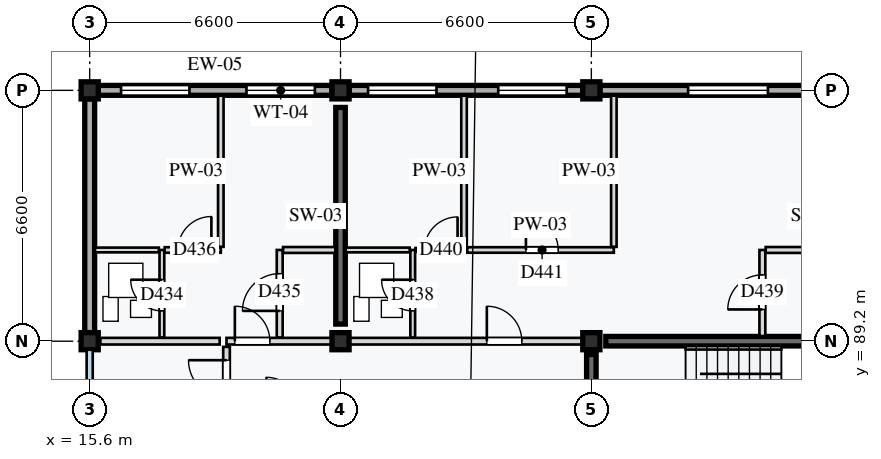
"""IFC4 building model, lengths in metres.
Left out: names, types, materials, properties, quantities, classifications, styles, units other than length and angle.
Written with IfcOpenShell. Run it as: python <this file> out.ifc"""

import sys

from ifc_helpers import new_model, si_unit, direction, frame, frame_2d, origin, origin_2d, place, context, subcontext, project, spatial, rectangle, extrude, element, fill, save


model = new_model("IFC4")
c1 = context("Model", 3, precision=1e-05, world=origin(), true_north=direction((0.0, 1.0)))
c2 = subcontext(c1, "Body", "Model", "MODEL_VIEW")
j1 = project(units=[si_unit("LENGTHUNIT", "METRE"), si_unit("PLANEANGLEUNIT", "RADIAN")], contexts=[c1])
p1 = place(None, origin())
s1 = spatial("IfcSite", under=j1, at=p1, CompositionType="ELEMENT")
p2 = place(p1, origin())
s2 = spatial("IfcBuilding", under=s1, at=p2, CompositionType="ELEMENT")
p3 = place(p2, frame((0.0, 0.0, 43.6)))
s3 = spatial("IfcBuildingStorey", under=s2, at=p3, CompositionType="ELEMENT", Elevation=43.6)
for number, where, z_axis, x_axis in (
    (1, (15.6, 89.2, 0.0), (0.0, 0.0, 1.0), (1.0, 0.0, 0.0)),
    (2, (15.6, 95.8, 0.0), (0.0, 0.0, 1.0), (1.0, 0.0, 0.0)),
    (3, (22.2, 89.2, 0.0), (0.0, 0.0, 1.0), (1.0, 0.0, 0.0)),
    (4, (22.2, 95.8, 0.0), (0.0, 0.0, 1.0), (1.0, 0.0, 0.0)),
    (5, (28.8, 89.2, 0.0), (0.0, 0.0, 1.0), (1.0, 0.0, 0.0)),
    (6, (28.8, 95.8, 0.0), (0.0, 0.0, 1.0), (1.0, 0.0, 0.0)),
):
    element("IfcColumn", number, at=place(p3, frame(where, z_axis=z_axis, x_axis=x_axis)), inside=s3, PredefinedType="COLUMN", context=c2, shape_type="SweptSolid", body=[
        extrude(rectangle(XDim=0.45, YDim=0.45, at=origin_2d()), origin(), (0.0, 0.0, 1.0), 3.2),
    ])
p4 = place(p3, frame((29.18, 89.2, 0.0), z_axis=(0.0, 0.0, 1.0), x_axis=(1.0, 0.0, 0.0)))
e7 = element("IfcWall", 7, at=p4, inside=s3, PredefinedType="SHEAR", context=c2, shape_type="SweptSolid", body=[
    extrude(rectangle(XDim=5.84, YDim=0.25, at=frame_2d((2.92, 0.0))), origin(), (0.0, 0.0, 1.0), 2.98),
])
p5 = place(p3, frame((28.8, 86.05, 0.0), z_axis=(0.0, 0.0, 1.0), x_axis=(0.0, 1.0, 0.0)))
e8 = element("IfcWall", 8, at=p5, inside=s3, PredefinedType="SHEAR", context=c2, shape_type="SweptSolid", body=[
    extrude(rectangle(XDim=2.8, YDim=0.25, at=frame_2d((1.4, 0.0))), origin(), (0.0, 0.0, 1.0), 2.98),
])
p6 = place(p3, frame((22.2, 89.65, 0.0), z_axis=(0.0, 0.0, 1.0), x_axis=(0.0, 1.0, 0.0)))
e9 = element("IfcWall", 9, at=p6, inside=s3, PredefinedType="SHEAR", context=c2, shape_type="SweptSolid", body=[
    extrude(rectangle(XDim=5.7, YDim=0.25, at=frame_2d((2.85, 0.0))), origin(), (0.0, 0.0, 1.0), 2.98),
])
p7 = place(p3, frame((15.825, 95.8, 0.0), z_axis=(0.0, 0.0, 1.0), x_axis=(1.0, 0.0, 0.0)))
e10 = element("IfcWall", 10, at=p7, inside=s3, PredefinedType="STANDARD", context=c2, shape_type="SweptSolid", body=[
    extrude(rectangle(XDim=6.15, YDim=0.26, at=frame_2d((3.075, 0.0))), origin(), (0.0, 0.0, 1.0), 2.6),
])
p8 = place(p7, frame((0.6, 0.0, 0.85)))
e11 = element("IfcOpeningElement", 11, at=p8, cuts=e10, PredefinedType="OPENING", context=c2, shape_type="SweptSolid", body=[
    extrude(rectangle(XDim=1.8, YDim=1.35, at=frame_2d((0.9, 0.675))), frame((0.0, 0.14, 0.0), z_axis=(0.0, -1.0, 0.0), x_axis=(1.0, 0.0, 0.0)), (0.0, 0.0, 1.0), 0.28),
])
p9 = place(p7, frame((3.9, 0.0, 0.85)))
e12 = element("IfcOpeningElement", 12, at=p9, cuts=e10, PredefinedType="OPENING", context=c2, shape_type="SweptSolid", body=[
    extrude(rectangle(XDim=1.8, YDim=1.55, at=frame_2d((0.9, 0.775))), frame((0.0, 0.14, 0.0), z_axis=(0.0, -1.0, 0.0), x_axis=(1.0, 0.0, 0.0)), (0.0, 0.0, 1.0), 0.28),
])
p10 = place(p3, frame((22.425, 95.8, 0.0), z_axis=(0.0, 0.0, 1.0), x_axis=(1.0, 0.0, 0.0)))
e13 = element("IfcWall", 13, at=p10, inside=s3, PredefinedType="STANDARD", context=c2, shape_type="SweptSolid", body=[
    extrude(rectangle(XDim=6.15, YDim=0.26, at=frame_2d((3.075, 0.0))), origin(), (0.0, 0.0, 1.0), 2.6),
])
p11 = place(p10, frame((0.5, 0.0, 0.85)))
e14 = element("IfcOpeningElement", 14, at=p11, cuts=e13, PredefinedType="OPENING", context=c2, shape_type="SweptSolid", body=[
    extrude(rectangle(XDim=1.8, YDim=1.35, at=frame_2d((0.9, 0.675))), frame((0.0, 0.14, 0.0), z_axis=(0.0, -1.0, 0.0), x_axis=(1.0, 0.0, 0.0)), (0.0, 0.0, 1.0), 0.28),
])
p12 = place(p10, frame((3.925, 0.0, 0.85)))
e15 = element("IfcOpeningElement", 15, at=p12, cuts=e13, PredefinedType="OPENING", context=c2, shape_type="SweptSolid", body=[
    extrude(rectangle(XDim=1.8, YDim=1.35, at=frame_2d((0.9, 0.675))), frame((0.0, 0.14, 0.0), z_axis=(0.0, -1.0, 0.0), x_axis=(1.0, 0.0, 0.0)), (0.0, 0.0, 1.0), 0.28),
])
p13 = place(p3, frame((29.025, 95.8, 0.0), z_axis=(0.0, 0.0, 1.0), x_axis=(1.0, 0.0, 0.0)))
e16 = element("IfcWall", 16, at=p13, inside=s3, PredefinedType="STANDARD", context=c2, shape_type="SweptSolid", body=[
    extrude(rectangle(XDim=6.15, YDim=0.26, at=frame_2d((3.075, 0.0))), origin(), (0.0, 0.0, 1.0), 2.6),
])
p14 = place(p13, frame((2.321, 0.0, 0.85)))
e17 = element("IfcOpeningElement", 17, at=p14, cuts=e16, PredefinedType="OPENING", context=c2, shape_type="SweptSolid", body=[
    extrude(rectangle(XDim=2.1, YDim=1.55, at=frame_2d((1.05, 0.775))), frame((0.0, 0.14, 0.0), z_axis=(0.0, -1.0, 0.0), x_axis=(1.0, 0.0, 0.0)), (0.0, 0.0, 1.0), 0.28),
])
p15 = place(p3, frame((15.6, 89.425, 0.0), z_axis=(0.0, 0.0, 1.0), x_axis=(0.0, 1.0, 0.0)))
e18 = element("IfcWall", 18, at=p15, inside=s3, PredefinedType="STANDARD", context=c2, shape_type="SweptSolid", body=[
    extrude(rectangle(XDim=6.15, YDim=0.26, at=frame_2d((3.075, 0.0))), origin(), (0.0, 0.0, 1.0), 2.65),
])
p16 = place(p3, frame((19.2, 86.05, 0.0), z_axis=(0.0, 0.0, 1.0), x_axis=(0.0, 1.0, 0.0)))
e19 = element("IfcWall", 19, at=p16, inside=s3, PredefinedType="PARTITIONING", context=c2, shape_type="SweptSolid", body=[
    extrude(rectangle(XDim=3.0, YDim=0.175, at=frame_2d((1.5, 0.0))), origin(), (0.0, 0.0, 1.0), 2.98),
])
p17 = place(p16, frame((1.65, 0.0, 0.0)))
e20 = element("IfcOpeningElement", 20, at=p17, cuts=e19, PredefinedType="OPENING", context=c2, shape_type="SweptSolid", body=[
    extrude(rectangle(XDim=1.0, YDim=2.16, at=frame_2d((0.5, 1.08))), frame((0.0, 0.097, 0.0), z_axis=(0.0, -1.0, 0.0), x_axis=(1.0, 0.0, 0.0)), (0.0, 0.0, 1.0), 0.195),
])
p18 = place(p3, frame((15.88, 89.2, 0.0), z_axis=(0.0, 0.0, 1.0), x_axis=(1.0, 0.0, 0.0)))
e21 = element("IfcWall", 21, at=p18, inside=s3, PredefinedType="PARTITIONING", context=c2, shape_type="SweptSolid", body=[
    extrude(rectangle(XDim=3.14, YDim=0.175, at=frame_2d((1.57, 0.0))), origin(), (0.0, 0.0, 1.0), 2.7),
])
p19 = place(p3, frame((19.2, 89.2, 0.0), z_axis=(0.0, 0.0, 1.0), x_axis=(1.0, 0.0, 0.0)))
e22 = element("IfcWall", 22, at=p19, inside=s3, PredefinedType="PARTITIONING", context=c2, shape_type="SweptSolid", body=[
    extrude(rectangle(XDim=3.0, YDim=0.175, at=frame_2d((1.5, 0.0))), origin(), (0.0, 0.0, 1.0), 2.7),
])
p20 = place(p19, frame((0.22, 0.0, 0.0)))
e23 = element("IfcOpeningElement", 23, at=p20, cuts=e22, PredefinedType="OPENING", context=c2, shape_type="SweptSolid", body=[
    extrude(rectangle(XDim=0.92, YDim=2.14, at=frame_2d((0.46, 1.07))), frame((0.0, 0.097, 0.0), z_axis=(0.0, -1.0, 0.0), x_axis=(1.0, 0.0, 0.0)), (0.0, 0.0, 1.0), 0.195),
])
p21 = place(p3, frame((17.5, 89.298, 0.0), z_axis=(0.0, 0.0, 1.0), x_axis=(0.0, 1.0, 0.0)))
e24 = element("IfcWall", 24, at=p21, inside=s3, PredefinedType="PARTITIONING", context=c2, shape_type="SweptSolid", body=[
    extrude(rectangle(XDim=2.302, YDim=0.125, at=frame_2d((1.151, 0.0))), origin(), (0.0, 0.0, 1.0), 2.98),
])
p22 = place(p21, frame((0.7, 0.0, 0.0)))
e25 = element("IfcOpeningElement", 25, at=p22, cuts=e24, PredefinedType="OPENING", context=c2, shape_type="SweptSolid", body=[
    extrude(rectangle(XDim=0.82, YDim=2.05, at=frame_2d((0.41, 1.025))), frame((0.0, 0.073, 0.0), z_axis=(0.0, -1.0, 0.0), x_axis=(1.0, 0.0, 0.0)), (0.0, 0.0, 1.0), 0.145),
])
p23 = place(p3, frame((15.74, 91.6, 0.0), z_axis=(0.0, 0.0, 1.0), x_axis=(1.0, 0.0, 0.0)))
e26 = element("IfcWall", 26, at=p23, inside=s3, PredefinedType="PARTITIONING", context=c2, shape_type="SweptSolid", body=[
    extrude(rectangle(XDim=1.68, YDim=0.125, at=frame_2d((0.84, 0.0))), origin(), (0.0, 0.0, 1.0), 2.98),
])
p24 = place(p3, frame((20.6, 89.298, 0.0), z_axis=(0.0, 0.0, 1.0), x_axis=(0.0, 1.0, 0.0)))
e27 = element("IfcWall", 27, at=p24, inside=s3, PredefinedType="PARTITIONING", context=c2, shape_type="SweptSolid", body=[
    extrude(rectangle(XDim=2.302, YDim=0.155, at=frame_2d((1.151, 0.0))), origin(), (0.0, 0.0, 1.0), 2.98),
])
p25 = place(p24, frame((0.7, 0.0, 0.0)))
e28 = element("IfcOpeningElement", 28, at=p25, cuts=e27, PredefinedType="OPENING", context=c2, shape_type="SweptSolid", body=[
    extrude(rectangle(XDim=0.98, YDim=2.12, at=frame_2d((0.49, 1.06))), frame((0.0, 0.087, 0.0), z_axis=(0.0, -1.0, 0.0), x_axis=(1.0, 0.0, 0.0)), (0.0, 0.0, 1.0), 0.175),
])
p26 = place(p3, frame((20.688, 91.6, 0.0), z_axis=(0.0, 0.0, 1.0), x_axis=(1.0, 0.0, 0.0)))
e29 = element("IfcWall", 29, at=p26, inside=s3, PredefinedType="PARTITIONING", context=c2, shape_type="SweptSolid", body=[
    extrude(rectangle(XDim=1.377, YDim=0.155, at=frame_2d((0.689, 0.0))), origin(), (0.0, 0.0, 1.0), 2.98),
])
p27 = place(p3, frame((17.573, 91.6, 0.0), z_axis=(0.0, 0.0, 1.0), x_axis=(1.0, 0.0, 0.0)))
e30 = element("IfcWall", 30, at=p27, inside=s3, PredefinedType="PARTITIONING", context=c2, shape_type="SweptSolid", body=[
    extrude(rectangle(XDim=1.478, YDim=0.145, at=frame_2d((0.739, 0.0))), origin(), (0.0, 0.0, 1.0), 2.98),
])
p28 = place(p27, frame((0.35, 0.0, 0.0)))
e31 = element("IfcOpeningElement", 31, at=p28, cuts=e30, PredefinedType="OPENING", context=c2, shape_type="SweptSolid", body=[
    extrude(rectangle(XDim=0.88, YDim=2.1, at=frame_2d((0.44, 1.05))), frame((0.0, 0.083, 0.0), z_axis=(0.0, -1.0, 0.0), x_axis=(1.0, 0.0, 0.0)), (0.0, 0.0, 1.0), 0.165),
])
p29 = place(p3, frame((19.05, 91.683, 0.0), z_axis=(0.0, 0.0, 1.0), x_axis=(0.0, 1.0, 0.0)))
e32 = element("IfcWall", 32, at=p29, inside=s3, PredefinedType="PARTITIONING", context=c2, shape_type="SweptSolid", body=[
    extrude(rectangle(XDim=3.977, YDim=0.145, at=frame_2d((1.989, 0.0))), origin(), (0.0, 0.0, 1.0), 2.98),
])
p30 = place(p3, frame((22.2, 89.2, 0.0), z_axis=(0.0, 0.0, 1.0), x_axis=(1.0, 0.0, 0.0)))
e33 = element("IfcWall", 33, at=p30, inside=s3, PredefinedType="PARTITIONING", context=c2, shape_type="SweptSolid", body=[
    extrude(rectangle(XDim=6.6, YDim=0.175, at=frame_2d((3.3, 0.0))), origin(), (0.0, 0.0, 1.0), 2.7),
])
p31 = place(p30, frame((3.85, 0.0, 0.0)))
e34 = element("IfcOpeningElement", 34, at=p31, cuts=e33, PredefinedType="OPENING", context=c2, shape_type="SweptSolid", body=[
    extrude(rectangle(XDim=0.92, YDim=2.14, at=frame_2d((0.46, 1.07))), frame((0.0, 0.097, 0.0), z_axis=(0.0, -1.0, 0.0), x_axis=(1.0, 0.0, 0.0)), (0.0, 0.0, 1.0), 0.195),
])
p32 = place(p3, frame((24.1, 89.298, 0.0), z_axis=(0.0, 0.0, 1.0), x_axis=(0.0, 1.0, 0.0)))
e35 = element("IfcWall", 35, at=p32, inside=s3, PredefinedType="PARTITIONING", context=c2, shape_type="SweptSolid", body=[
    extrude(rectangle(XDim=2.302, YDim=0.125, at=frame_2d((1.151, 0.0))), origin(), (0.0, 0.0, 1.0), 2.98),
])
p33 = place(p32, frame((0.7, 0.0, 0.0)))
e36 = element("IfcOpeningElement", 36, at=p33, cuts=e35, PredefinedType="OPENING", context=c2, shape_type="SweptSolid", body=[
    extrude(rectangle(XDim=0.82, YDim=2.05, at=frame_2d((0.41, 1.025))), frame((0.0, 0.073, 0.0), z_axis=(0.0, -1.0, 0.0), x_axis=(1.0, 0.0, 0.0)), (0.0, 0.0, 1.0), 0.145),
])
p34 = place(p3, frame((22.335, 91.6, 0.0), z_axis=(0.0, 0.0, 1.0), x_axis=(1.0, 0.0, 0.0)))
e37 = element("IfcWall", 37, at=p34, inside=s3, PredefinedType="PARTITIONING", context=c2, shape_type="SweptSolid", body=[
    extrude(rectangle(XDim=1.685, YDim=0.125, at=frame_2d((0.843, 0.0))), origin(), (0.0, 0.0, 1.0), 2.98),
])
p35 = place(p3, frame((33.3, 89.335, 0.0), z_axis=(0.0, 0.0, 1.0), x_axis=(0.0, 1.0, 0.0)))
e38 = element("IfcWall", 38, at=p35, inside=s3, PredefinedType="PARTITIONING", context=c2, shape_type="SweptSolid", body=[
    extrude(rectangle(XDim=2.265, YDim=0.155, at=frame_2d((1.133, 0.0))), origin(), (0.0, 0.0, 1.0), 2.98),
])
p36 = place(p35, frame((0.7, 0.0, 0.0)))
e39 = element("IfcOpeningElement", 39, at=p36, cuts=e38, PredefinedType="OPENING", context=c2, shape_type="SweptSolid", body=[
    extrude(rectangle(XDim=0.91, YDim=2.14, at=frame_2d((0.455, 1.07))), frame((0.0, 0.087, 0.0), z_axis=(0.0, -1.0, 0.0), x_axis=(1.0, 0.0, 0.0)), (0.0, 0.0, 1.0), 0.175),
])
p37 = place(p3, frame((33.387, 91.6, 0.0), z_axis=(0.0, 0.0, 1.0), x_axis=(1.0, 0.0, 0.0)))
e40 = element("IfcWall", 40, at=p37, inside=s3, PredefinedType="PARTITIONING", context=c2, shape_type="SweptSolid", body=[
    extrude(rectangle(XDim=1.877, YDim=0.155, at=frame_2d((0.939, 0.0))), origin(), (0.0, 0.0, 1.0), 2.98),
])
p38 = place(p3, frame((24.173, 91.6, 0.0), z_axis=(0.0, 0.0, 1.0), x_axis=(1.0, 0.0, 0.0)))
e41 = element("IfcWall", 41, at=p38, inside=s3, PredefinedType="PARTITIONING", context=c2, shape_type="SweptSolid", body=[
    extrude(rectangle(XDim=1.277, YDim=0.105, at=frame_2d((0.639, 0.0))), origin(), (0.0, 0.0, 1.0), 2.98),
])
p39 = place(p38, frame((0.238, 0.0, 0.0)))
e42 = element("IfcOpeningElement", 42, at=p39, cuts=e41, PredefinedType="OPENING", context=c2, shape_type="SweptSolid", body=[
    extrude(rectangle(XDim=0.87, YDim=2.08, at=frame_2d((0.435, 1.04))), frame((0.0, 0.062, 0.0), z_axis=(0.0, -1.0, 0.0), x_axis=(1.0, 0.0, 0.0)), (0.0, 0.0, 1.0), 0.125),
])
p40 = place(p3, frame((25.45, 91.68, 0.0), z_axis=(0.0, 0.0, 1.0), x_axis=(0.0, 1.0, 0.0)))
e43 = element("IfcWall", 43, at=p40, inside=s3, PredefinedType="PARTITIONING", context=c2, shape_type="SweptSolid", body=[
    extrude(rectangle(XDim=3.98, YDim=0.145, at=frame_2d((1.99, 0.0))), origin(), (0.0, 0.0, 1.0), 2.98),
])
p41 = place(p3, frame((25.532, 91.6, 0.0), z_axis=(0.0, 0.0, 1.0), x_axis=(1.0, 0.0, 0.0)))
e44 = element("IfcWall", 44, at=p41, inside=s3, PredefinedType="PARTITIONING", context=c2, shape_type="SweptSolid", body=[
    extrude(rectangle(XDim=3.86, YDim=0.145, at=frame_2d((1.93, 0.0))), origin(), (0.0, 0.0, 1.0), 2.98),
])
p42 = place(p41, frame((1.546, 0.0, 0.0)))
e45 = element("IfcOpeningElement", 45, at=p42, cuts=e44, PredefinedType="OPENING", context=c2, shape_type="SweptSolid", body=[
    extrude(rectangle(XDim=0.85, YDim=2.1, at=frame_2d((0.425, 1.05))), frame((0.0, 0.083, 0.0), z_axis=(0.0, -1.0, 0.0), x_axis=(1.0, 0.0, 0.0)), (0.0, 0.0, 1.0), 0.165),
])
p43 = place(p3, frame((29.392, 91.683, 0.0), z_axis=(0.0, 0.0, 1.0), x_axis=(0.0, 1.0, 0.0)))
e46 = element("IfcWall", 46, at=p43, inside=s3, PredefinedType="PARTITIONING", context=c2, shape_type="SweptSolid", body=[
    extrude(rectangle(XDim=3.977, YDim=0.145, at=frame_2d((1.989, 0.0))), origin(), (0.0, 0.0, 1.0), 2.98),
])
p44 = place(p8, origin())
e47 = element("IfcWindow", 47, at=p44, inside=s3, PartitioningType="SINGLE_PANEL", PredefinedType="WINDOW", context=c2, shape_type="SweptSolid", body=[
    extrude(rectangle(XDim=1.8, YDim=1.35, at=frame_2d((0.9, 0.675))), frame((0.0, 0.03, 0.0), z_axis=(0.0, -1.0, 0.0), x_axis=(1.0, 0.0, 0.0)), (0.0, 0.0, 1.0), 0.06),
])
fill(e11, e47)
p45 = place(p9, origin())
e48 = element("IfcWindow", 48, at=p45, inside=s3, PartitioningType="SINGLE_PANEL", PredefinedType="WINDOW", context=c2, shape_type="SweptSolid", body=[
    extrude(rectangle(XDim=1.8, YDim=1.55, at=frame_2d((0.9, 0.775))), frame((0.0, 0.03, 0.0), z_axis=(0.0, -1.0, 0.0), x_axis=(1.0, 0.0, 0.0)), (0.0, 0.0, 1.0), 0.06),
])
fill(e12, e48)
p46 = place(p11, origin())
e49 = element("IfcWindow", 49, at=p46, inside=s3, PartitioningType="SINGLE_PANEL", PredefinedType="WINDOW", context=c2, shape_type="SweptSolid", body=[
    extrude(rectangle(XDim=1.8, YDim=1.35, at=frame_2d((0.9, 0.675))), frame((0.0, 0.03, 0.0), z_axis=(0.0, -1.0, 0.0), x_axis=(1.0, 0.0, 0.0)), (0.0, 0.0, 1.0), 0.06),
])
fill(e14, e49)
p47 = place(p12, origin())
e50 = element("IfcWindow", 50, at=p47, inside=s3, PartitioningType="SINGLE_PANEL", PredefinedType="WINDOW", context=c2, shape_type="SweptSolid", body=[
    extrude(rectangle(XDim=1.8, YDim=1.35, at=frame_2d((0.9, 0.675))), frame((0.0, 0.03, 0.0), z_axis=(0.0, -1.0, 0.0), x_axis=(1.0, 0.0, 0.0)), (0.0, 0.0, 1.0), 0.06),
])
fill(e15, e50)
p48 = place(p14, origin())
e51 = element("IfcWindow", 51, at=p48, inside=s3, PartitioningType="SINGLE_PANEL", PredefinedType="WINDOW", context=c2, shape_type="SweptSolid", body=[
    extrude(rectangle(XDim=2.1, YDim=1.55, at=frame_2d((1.05, 0.775))), frame((0.0, 0.03, 0.0), z_axis=(0.0, -1.0, 0.0), x_axis=(1.0, 0.0, 0.0)), (0.0, 0.0, 1.0), 0.06),
])
fill(e17, e51)
p49 = place(p17, origin())
e52 = element("IfcDoor", 52, at=p49, inside=s3, OperationType="SINGLE_SWING_RIGHT", PredefinedType="DOOR", context=c2, shape_type="SweptSolid", body=[
    extrude(rectangle(XDim=1.0, YDim=2.16, at=frame_2d((0.5, 1.08))), frame((0.0, 0.025, 0.0), z_axis=(0.0, -1.0, 0.0), x_axis=(1.0, 0.0, 0.0)), (0.0, 0.0, 1.0), 0.05),
])
fill(e20, e52)
p50 = place(p20, origin())
e53 = element("IfcDoor", 53, at=p50, inside=s3, OperationType="SINGLE_SWING_LEFT", PredefinedType="DOOR", context=c2, shape_type="SweptSolid", body=[
    extrude(rectangle(XDim=0.92, YDim=2.14, at=frame_2d((0.46, 1.07))), frame((0.0, 0.025, 0.0), z_axis=(0.0, -1.0, 0.0), x_axis=(1.0, 0.0, 0.0)), (0.0, 0.0, 1.0), 0.05),
])
fill(e23, e53)
p51 = place(p22, origin())
e54 = element("IfcDoor", 54, at=p51, inside=s3, OperationType="SINGLE_SWING_RIGHT", PredefinedType="DOOR", context=c2, shape_type="SweptSolid", body=[
    extrude(rectangle(XDim=0.82, YDim=2.05, at=frame_2d((0.41, 1.025))), frame((0.0, 0.025, 0.0), z_axis=(0.0, -1.0, 0.0), x_axis=(1.0, 0.0, 0.0)), (0.0, 0.0, 1.0), 0.05),
])
fill(e25, e54)
p52 = place(p25, origin())
e55 = element("IfcDoor", 55, at=p52, inside=s3, OperationType="SINGLE_SWING_LEFT", PredefinedType="DOOR", context=c2, shape_type="SweptSolid", body=[
    extrude(rectangle(XDim=0.98, YDim=2.12, at=frame_2d((0.49, 1.06))), frame((0.0, 0.025, 0.0), z_axis=(0.0, -1.0, 0.0), x_axis=(1.0, 0.0, 0.0)), (0.0, 0.0, 1.0), 0.05),
])
fill(e28, e55)
p53 = place(p28, origin())
e56 = element("IfcDoor", 56, at=p53, inside=s3, OperationType="SINGLE_SWING_RIGHT", PredefinedType="DOOR", context=c2, shape_type="SweptSolid", body=[
    extrude(rectangle(XDim=0.88, YDim=2.1, at=frame_2d((0.44, 1.05))), frame((0.0, 0.025, 0.0), z_axis=(0.0, -1.0, 0.0), x_axis=(1.0, 0.0, 0.0)), (0.0, 0.0, 1.0), 0.05),
])
fill(e31, e56)
p54 = place(p31, origin())
e57 = element("IfcDoor", 57, at=p54, inside=s3, OperationType="SINGLE_SWING_LEFT", PredefinedType="DOOR", context=c2, shape_type="SweptSolid", body=[
    extrude(rectangle(XDim=0.92, YDim=2.14, at=frame_2d((0.46, 1.07))), frame((0.0, 0.025, 0.0), z_axis=(0.0, -1.0, 0.0), x_axis=(1.0, 0.0, 0.0)), (0.0, 0.0, 1.0), 0.05),
])
fill(e34, e57)
p55 = place(p33, origin())
e58 = element("IfcDoor", 58, at=p55, inside=s3, OperationType="SINGLE_SWING_RIGHT", PredefinedType="DOOR", context=c2, shape_type="SweptSolid", body=[
    extrude(rectangle(XDim=0.82, YDim=2.05, at=frame_2d((0.41, 1.025))), frame((0.0, 0.025, 0.0), z_axis=(0.0, -1.0, 0.0), x_axis=(1.0, 0.0, 0.0)), (0.0, 0.0, 1.0), 0.05),
])
fill(e36, e58)
p56 = place(p36, origin())
e59 = element("IfcDoor", 59, at=p56, inside=s3, OperationType="SINGLE_SWING_LEFT", PredefinedType="DOOR", context=c2, shape_type="SweptSolid", body=[
    extrude(rectangle(XDim=0.91, YDim=2.14, at=frame_2d((0.455, 1.07))), frame((0.0, 0.025, 0.0), z_axis=(0.0, -1.0, 0.0), x_axis=(1.0, 0.0, 0.0)), (0.0, 0.0, 1.0), 0.05),
])
fill(e39, e59)
p57 = place(p39, origin())
e60 = element("IfcDoor", 60, at=p57, inside=s3, OperationType="SINGLE_SWING_RIGHT", PredefinedType="DOOR", context=c2, shape_type="SweptSolid", body=[
    extrude(rectangle(XDim=0.87, YDim=2.08, at=frame_2d((0.435, 1.04))), frame((0.0, 0.025, 0.0), z_axis=(0.0, -1.0, 0.0), x_axis=(1.0, 0.0, 0.0)), (0.0, 0.0, 1.0), 0.05),
])
fill(e42, e60)
p58 = place(p42, origin())
e61 = element("IfcDoor", 61, at=p58, inside=s3, OperationType="SINGLE_SWING_LEFT", PredefinedType="DOOR", context=c2, shape_type="SweptSolid", body=[
    extrude(rectangle(XDim=0.85, YDim=2.1, at=frame_2d((0.425, 1.05))), frame((0.0, 0.025, 0.0), z_axis=(0.0, -1.0, 0.0), x_axis=(1.0, 0.0, 0.0)), (0.0, 0.0, 1.0), 0.05),
])
fill(e45, e61)
save(model, sys.argv[1])
